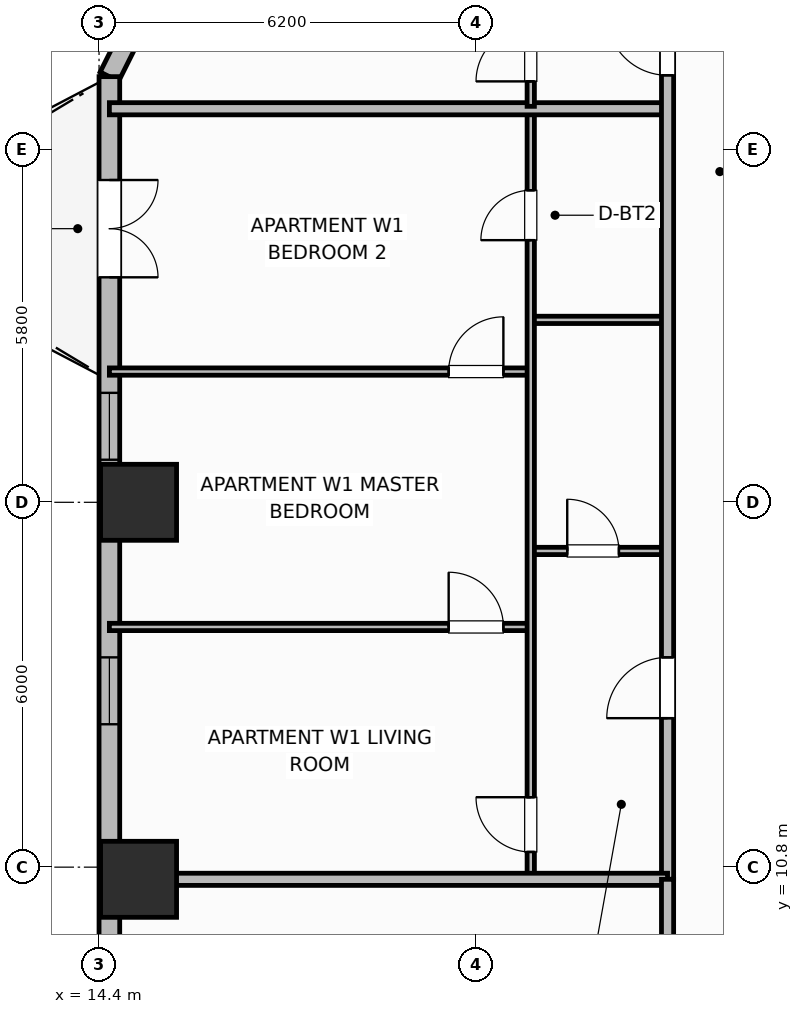
"""IFC4 building model, lengths in metres.
Left out: names, types, materials, properties, quantities, classifications, styles, units other than length and angle.
Written with IfcOpenShell. Run it as: python <this file> out.ifc"""

import sys

from ifc_helpers import new_model, si_unit, direction, frame, frame_2d, origin, origin_2d, place, context, subcontext, project, spatial, rectangle, extrude, element, fill, save


model = new_model("IFC4")
c1 = context("Model", 3, precision=1e-05, world=origin(), true_north=direction((0.0, 1.0)))
c2 = subcontext(c1, "Body", "Model", "MODEL_VIEW")
j1 = project(units=[si_unit("LENGTHUNIT", "METRE"), si_unit("PLANEANGLEUNIT", "RADIAN")], contexts=[c1])
p1 = place(None, origin())
s1 = spatial("IfcSite", under=j1, at=p1, CompositionType="ELEMENT")
p2 = place(p1, origin())
s2 = spatial("IfcBuilding", under=s1, at=p2, CompositionType="ELEMENT")
p3 = place(p2, frame((0.0, 0.0, 73.2)))
s3 = spatial("IfcBuildingStorey", under=s2, at=p3, CompositionType="ELEMENT", Elevation=73.2)
for number, where, z_axis, x_axis in (
    (1, (15.05, 10.6, 0.0), (0.0, 0.0, 1.0), (1.0, 0.0, 0.0)),
    (2, (15.05, 16.8, 0.0), (0.0, 0.0, 1.0), (1.0, 0.0, 0.0)),
):
    element("IfcColumn", number, at=place(p3, frame(where, z_axis=z_axis, x_axis=x_axis)), inside=s3, PredefinedType="COLUMN", context=c2, shape_type="SweptSolid", body=[
        extrude(rectangle(XDim=1.25, YDim=1.25, at=origin_2d()), origin(), (0.0, 0.0, 1.0), 3.7),
    ])
p4 = place(p3, frame((15.67, 26.0, 0.0), z_axis=(0.0, 0.0, 1.0), x_axis=(-0.447173890385, -0.894447042456, 0.0)))
e3 = element("IfcWall", 3, at=p4, inside=s3, PredefinedType="SOLIDWALL", context=c2, shape_type="SweptSolid", body=[
    extrude(rectangle(XDim=2.459, YDim=0.34, at=frame_2d((1.23, 0.0))), origin(), (0.0, 0.0, 1.0), 2.66),
])
p5 = place(p4, frame((0.68, 0.0, 0.85)))
e4 = element("IfcOpeningElement", 4, at=p5, cuts=e3, PredefinedType="OPENING", context=c2, shape_type="SweptSolid", body=[
    extrude(rectangle(XDim=1.1, YDim=1.65, at=frame_2d((0.55, 0.825))), frame((0.0, 0.18, 0.0), z_axis=(0.0, -1.0, 0.0), x_axis=(1.0, 0.0, 0.0)), (0.0, 0.0, 1.0), 0.36),
])
p6 = place(p3, frame((14.57, 23.8, 0.0), z_axis=(0.0, 0.0, 1.0), x_axis=(0.0, -1.0, 0.0)))
e5 = element("IfcWall", 5, at=p6, inside=s3, PredefinedType="SOLIDWALL", context=c2, shape_type="SweptSolid", body=[
    extrude(rectangle(XDim=14.8, YDim=0.34, at=frame_2d((7.4, 0.0))), origin(), (0.0, 0.0, 1.0), 2.66),
])
p7 = place(p6, frame((1.7, 0.0, 0.0)))
e6 = element("IfcOpeningElement", 6, at=p7, cuts=e5, PredefinedType="OPENING", context=c2, shape_type="SweptSolid", body=[
    extrude(rectangle(XDim=1.6, YDim=2.1, at=frame_2d((0.8, 1.05))), frame((0.0, 0.18, 0.0), z_axis=(0.0, -1.0, 0.0), x_axis=(1.0, 0.0, 0.0)), (0.0, 0.0, 1.0), 0.36),
])
p8 = place(p6, frame((5.2, 0.0, 0.85)))
e7 = element("IfcOpeningElement", 7, at=p8, cuts=e5, PredefinedType="OPENING", context=c2, shape_type="SweptSolid", body=[
    extrude(rectangle(XDim=1.1, YDim=1.65, at=frame_2d((0.55, 0.825))), frame((0.0, 0.18, 0.0), z_axis=(0.0, -1.0, 0.0), x_axis=(1.0, 0.0, 0.0)), (0.0, 0.0, 1.0), 0.36),
])
p9 = place(p6, frame((9.55, 0.0, 0.89)))
e8 = element("IfcOpeningElement", 8, at=p9, cuts=e5, PredefinedType="OPENING", context=c2, shape_type="SweptSolid", body=[
    extrude(rectangle(XDim=1.1, YDim=1.65, at=frame_2d((0.55, 0.825))), frame((0.0, 0.18, 0.0), z_axis=(0.0, -1.0, 0.0), x_axis=(1.0, 0.0, 0.0)), (0.0, 0.0, 1.0), 0.36),
])
p10 = place(p3, frame((21.5, 16.0, 0.0), z_axis=(0.0, 0.0, 1.0), x_axis=(1.0, 0.0, 0.0)))
e9 = element("IfcWall", 9, at=p10, inside=s3, PredefinedType="PARTITIONING", context=c2, shape_type="SweptSolid", body=[
    extrude(rectangle(XDim=2.25, YDim=0.12, at=frame_2d((1.125, 0.0))), origin(), (0.0, 0.0, 1.0), 2.49),
])
p11 = place(p10, frame((0.6, 0.0, 0.0)))
e10 = element("IfcOpeningElement", 10, at=p11, cuts=e9, PredefinedType="OPENING", context=c2, shape_type="SweptSolid", body=[
    extrude(rectangle(XDim=0.85, YDim=2.1, at=frame_2d((0.425, 1.05))), frame((0.0, 0.07, 0.0), z_axis=(0.0, -1.0, 0.0), x_axis=(1.0, 0.0, 0.0)), (0.0, 0.0, 1.0), 0.14),
])
p12 = place(p3, frame((21.5, 19.8, 0.0), z_axis=(0.0, 0.0, 1.0), x_axis=(1.0, 0.0, 0.0)))
e11 = element("IfcWall", 11, at=p12, inside=s3, PredefinedType="PARTITIONING", context=c2, shape_type="SweptSolid", body=[
    extrude(rectangle(XDim=2.25, YDim=0.12, at=frame_2d((1.125, 0.0))), origin(), (0.0, 0.0, 1.0), 2.49),
])
p13 = place(p3, frame((14.57, 14.75, 0.0), z_axis=(0.0, 0.0, 1.0), x_axis=(1.0, 0.0, 0.0)))
e12 = element("IfcWall", 12, at=p13, inside=s3, PredefinedType="PARTITIONING", context=c2, shape_type="SweptSolid", body=[
    extrude(rectangle(XDim=6.93, YDim=0.12, at=frame_2d((3.465, 0.0))), origin(), (0.0, 0.0, 1.0), 2.49),
])
p14 = place(p13, frame((5.58, 0.0, 0.0)))
e13 = element("IfcOpeningElement", 13, at=p14, cuts=e12, PredefinedType="OPENING", context=c2, shape_type="SweptSolid", body=[
    extrude(rectangle(XDim=0.9, YDim=2.1, at=frame_2d((0.45, 1.05))), frame((0.0, 0.07, 0.0), z_axis=(0.0, -1.0, 0.0), x_axis=(1.0, 0.0, 0.0)), (0.0, 0.0, 1.0), 0.14),
])
p15 = place(p3, frame((14.57, 18.95, 0.0), z_axis=(0.0, 0.0, 1.0), x_axis=(1.0, 0.0, 0.0)))
e14 = element("IfcWall", 14, at=p15, inside=s3, PredefinedType="PARTITIONING", context=c2, shape_type="SweptSolid", body=[
    extrude(rectangle(XDim=6.93, YDim=0.12, at=frame_2d((3.465, 0.0))), origin(), (0.0, 0.0, 1.0), 2.49),
])
p16 = place(p15, frame((5.58, 0.0, 0.0)))
e15 = element("IfcOpeningElement", 15, at=p16, cuts=e14, PredefinedType="OPENING", context=c2, shape_type="SweptSolid", body=[
    extrude(rectangle(XDim=0.9, YDim=2.1, at=frame_2d((0.45, 1.05))), frame((0.0, 0.07, 0.0), z_axis=(0.0, -1.0, 0.0), x_axis=(1.0, 0.0, 0.0)), (0.0, 0.0, 1.0), 0.14),
])
p17 = place(p3, frame((21.5, 10.64, 0.0), z_axis=(0.0, 0.0, 1.0), x_axis=(0.0, 1.0, 0.0)))
e16 = element("IfcWall", 16, at=p17, inside=s3, PredefinedType="PARTITIONING", context=c2, shape_type="SweptSolid", body=[
    extrude(rectangle(XDim=12.592, YDim=0.12, at=frame_2d((6.296, 0.0))), origin(), (0.0, 0.0, 1.0), 2.49),
])
p18 = place(p17, frame((0.41, 0.0, 0.0)))
e17 = element("IfcOpeningElement", 17, at=p18, cuts=e16, PredefinedType="OPENING", context=c2, shape_type="SweptSolid", body=[
    extrude(rectangle(XDim=0.9, YDim=2.1, at=frame_2d((0.45, 1.05))), frame((0.0, 0.07, 0.0), z_axis=(0.0, -1.0, 0.0), x_axis=(1.0, 0.0, 0.0)), (0.0, 0.0, 1.0), 0.14),
])
p19 = place(p17, frame((10.471, 0.0, 0.0)))
e18 = element("IfcOpeningElement", 18, at=p19, cuts=e16, PredefinedType="OPENING", context=c2, shape_type="SweptSolid", body=[
    extrude(rectangle(XDim=0.82, YDim=2.08, at=frame_2d((0.41, 1.04))), frame((0.0, 0.07, 0.0), z_axis=(0.0, -1.0, 0.0), x_axis=(1.0, 0.0, 0.0)), (0.0, 0.0, 1.0), 0.14),
])
p20 = place(p3, frame((14.57, 23.272, 0.0), z_axis=(0.0, 0.0, 1.0), x_axis=(1.0, 0.0, 0.0)))
e19 = element("IfcWall", 19, at=p20, inside=s3, PredefinedType="PARTITIONING", context=c2, shape_type="SweptSolid", body=[
    extrude(rectangle(XDim=9.18, YDim=0.2, at=frame_2d((4.59, 0.0))), origin(), (0.0, 0.0, 1.0), 2.49),
])
p21 = place(p3, frame((21.5, 23.312, 0.0), z_axis=(0.0, 0.0, 1.0), x_axis=(0.0, 1.0, 0.0)))
e20 = element("IfcWall", 20, at=p21, inside=s3, PredefinedType="PARTITIONING", context=c2, shape_type="SweptSolid", body=[
    extrude(rectangle(XDim=11.888, YDim=0.12, at=frame_2d((5.944, 0.0))), origin(), (0.0, 0.0, 1.0), 2.49),
])
p22 = place(p21, frame((0.41, 0.0, 0.0)))
e21 = element("IfcOpeningElement", 21, at=p22, cuts=e20, PredefinedType="OPENING", context=c2, shape_type="SweptSolid", body=[
    extrude(rectangle(XDim=0.9, YDim=2.1, at=frame_2d((0.45, 1.05))), frame((0.0, 0.07, 0.0), z_axis=(0.0, -1.0, 0.0), x_axis=(1.0, 0.0, 0.0)), (0.0, 0.0, 1.0), 0.14),
])
p23 = place(p21, frame((10.119, 0.0, 0.0)))
e22 = element("IfcOpeningElement", 22, at=p23, cuts=e20, PredefinedType="OPENING", context=c2, shape_type="SweptSolid", body=[
    extrude(rectangle(XDim=0.82, YDim=2.08, at=frame_2d((0.41, 1.04))), frame((0.0, 0.07, 0.0), z_axis=(0.0, -1.0, 0.0), x_axis=(1.0, 0.0, 0.0)), (0.0, 0.0, 1.0), 0.14),
])
p24 = place(p3, frame((23.75, 10.6, 0.0), z_axis=(0.0, 0.0, 1.0), x_axis=(0.0, 1.0, 0.0)))
e23 = element("IfcWall", 23, at=p24, inside=s3, PredefinedType="PARTITIONING", context=c2, shape_type="SweptSolid", body=[
    extrude(rectangle(XDim=35.2, YDim=0.2, at=frame_2d((17.6, 0.0))), origin(), (0.0, 0.0, 1.0), 2.49),
])
p25 = place(p24, frame((2.65, 0.0, 0.0)))
e24 = element("IfcOpeningElement", 24, at=p25, cuts=e23, PredefinedType="OPENING", context=c2, shape_type="SweptSolid", body=[
    extrude(rectangle(XDim=1.0, YDim=2.15, at=frame_2d((0.5, 1.075))), frame((0.0, 0.11, 0.0), z_axis=(0.0, -1.0, 0.0), x_axis=(1.0, 0.0, 0.0)), (0.0, 0.0, 1.0), 0.22),
])
p26 = place(p24, frame((13.222, 0.0, 0.0)))
e25 = element("IfcOpeningElement", 25, at=p26, cuts=e23, PredefinedType="OPENING", context=c2, shape_type="SweptSolid", body=[
    extrude(rectangle(XDim=1.0, YDim=2.15, at=frame_2d((0.5, 1.075))), frame((0.0, 0.11, 0.0), z_axis=(0.0, -1.0, 0.0), x_axis=(1.0, 0.0, 0.0)), (0.0, 0.0, 1.0), 0.22),
])
p27 = place(p24, frame((25.19, 0.0, 0.0)))
e26 = element("IfcOpeningElement", 26, at=p27, cuts=e23, PredefinedType="OPENING", context=c2, shape_type="SweptSolid", body=[
    extrude(rectangle(XDim=1.0, YDim=2.15, at=frame_2d((0.5, 1.075))), frame((0.0, 0.11, 0.0), z_axis=(0.0, -1.0, 0.0), x_axis=(1.0, 0.0, 0.0)), (0.0, 0.0, 1.0), 0.22),
])
p28 = place(p3, frame((14.99, 10.6, 0.0), z_axis=(0.0, 0.0, 1.0), x_axis=(1.0, 0.0, 0.0)))
e27 = element("IfcWall", 27, at=p28, inside=s3, PredefinedType="PARTITIONING", context=c2, shape_type="SweptSolid", body=[
    extrude(rectangle(XDim=8.76, YDim=0.2, at=frame_2d((4.38, 0.0))), origin(), (0.0, 0.0, 1.0), 2.49),
])
p29 = place(p3, frame((23.75, 4.97, 0.0), z_axis=(0.0, 0.0, 1.0), x_axis=(0.0, 1.0, 0.0)))
e28 = element("IfcWall", 28, at=p29, inside=s3, PredefinedType="PARTITIONING", context=c2, shape_type="SweptSolid", body=[
    extrude(rectangle(XDim=5.63, YDim=0.2, at=frame_2d((2.815, 0.0))), origin(), (0.0, 0.0, 1.0), 2.49),
])
p30 = place(p7, origin())
e29 = element("IfcDoor", 29, at=p30, inside=s3, OperationType="DOUBLE_DOOR_SINGLE_SWING", PredefinedType="DOOR", context=c2, shape_type="SweptSolid", body=[
    extrude(rectangle(XDim=1.6, YDim=2.1, at=frame_2d((0.8, 1.05))), frame((0.0, 0.025, 0.0), z_axis=(0.0, -1.0, 0.0), x_axis=(1.0, 0.0, 0.0)), (0.0, 0.0, 1.0), 0.05),
])
fill(e6, e29)
p31 = place(p8, origin())
e30 = element("IfcWindow", 30, at=p31, inside=s3, PartitioningType="SINGLE_PANEL", PredefinedType="WINDOW", context=c2, shape_type="SweptSolid", body=[
    extrude(rectangle(XDim=1.1, YDim=1.65, at=frame_2d((0.55, 0.825))), frame((0.0, 0.03, 0.0), z_axis=(0.0, -1.0, 0.0), x_axis=(1.0, 0.0, 0.0)), (0.0, 0.0, 1.0), 0.06),
])
fill(e7, e30)
p32 = place(p9, origin())
e31 = element("IfcWindow", 31, at=p32, inside=s3, PartitioningType="SINGLE_PANEL", PredefinedType="WINDOW", context=c2, shape_type="SweptSolid", body=[
    extrude(rectangle(XDim=1.1, YDim=1.65, at=frame_2d((0.55, 0.825))), frame((0.0, 0.03, 0.0), z_axis=(0.0, -1.0, 0.0), x_axis=(1.0, 0.0, 0.0)), (0.0, 0.0, 1.0), 0.06),
])
fill(e8, e31)
p33 = place(p11, origin())
e32 = element("IfcDoor", 32, at=p33, inside=s3, OperationType="SINGLE_SWING_LEFT", PredefinedType="DOOR", context=c2, shape_type="SweptSolid", body=[
    extrude(rectangle(XDim=0.85, YDim=2.1, at=frame_2d((0.425, 1.05))), frame((0.0, 0.025, 0.0), z_axis=(0.0, -1.0, 0.0), x_axis=(1.0, 0.0, 0.0)), (0.0, 0.0, 1.0), 0.05),
])
fill(e10, e32)
p34 = place(p14, origin())
e33 = element("IfcDoor", 33, at=p34, inside=s3, OperationType="SINGLE_SWING_LEFT", PredefinedType="DOOR", context=c2, shape_type="SweptSolid", body=[
    extrude(rectangle(XDim=0.9, YDim=2.1, at=frame_2d((0.45, 1.05))), frame((0.0, 0.025, 0.0), z_axis=(0.0, -1.0, 0.0), x_axis=(1.0, 0.0, 0.0)), (0.0, 0.0, 1.0), 0.05),
])
fill(e13, e33)
p35 = place(p16, origin())
e34 = element("IfcDoor", 34, at=p35, inside=s3, OperationType="SINGLE_SWING_RIGHT", PredefinedType="DOOR", context=c2, shape_type="SweptSolid", body=[
    extrude(rectangle(XDim=0.9, YDim=2.1, at=frame_2d((0.45, 1.05))), frame((0.0, 0.025, 0.0), z_axis=(0.0, -1.0, 0.0), x_axis=(1.0, 0.0, 0.0)), (0.0, 0.0, 1.0), 0.05),
])
fill(e15, e34)
p36 = place(p18, origin())
e35 = element("IfcDoor", 35, at=p36, inside=s3, OperationType="SINGLE_SWING_RIGHT", PredefinedType="DOOR", context=c2, shape_type="SweptSolid", body=[
    extrude(rectangle(XDim=0.9, YDim=2.1, at=frame_2d((0.45, 1.05))), frame((0.0, 0.025, 0.0), z_axis=(0.0, -1.0, 0.0), x_axis=(1.0, 0.0, 0.0)), (0.0, 0.0, 1.0), 0.05),
])
fill(e17, e35)
p37 = place(p19, origin())
e36 = element("IfcDoor", 36, at=p37, inside=s3, OperationType="SINGLE_SWING_LEFT", PredefinedType="DOOR", context=c2, shape_type="SweptSolid", body=[
    extrude(rectangle(XDim=0.82, YDim=2.08, at=frame_2d((0.41, 1.04))), frame((0.0, 0.025, 0.0), z_axis=(0.0, -1.0, 0.0), x_axis=(1.0, 0.0, 0.0)), (0.0, 0.0, 1.0), 0.05),
])
fill(e18, e36)
p38 = place(p22, origin())
e37 = element("IfcDoor", 37, at=p38, inside=s3, OperationType="SINGLE_SWING_LEFT", PredefinedType="DOOR", context=c2, shape_type="SweptSolid", body=[
    extrude(rectangle(XDim=0.9, YDim=2.1, at=frame_2d((0.45, 1.05))), frame((0.0, 0.025, 0.0), z_axis=(0.0, -1.0, 0.0), x_axis=(1.0, 0.0, 0.0)), (0.0, 0.0, 1.0), 0.05),
])
fill(e21, e37)
p39 = place(p25, origin())
e38 = element("IfcDoor", 38, at=p39, inside=s3, OperationType="SINGLE_SWING_LEFT", PredefinedType="DOOR", context=c2, shape_type="SweptSolid", body=[
    extrude(rectangle(XDim=1.0, YDim=2.15, at=frame_2d((0.5, 1.075))), frame((0.0, 0.025, 0.0), z_axis=(0.0, -1.0, 0.0), x_axis=(1.0, 0.0, 0.0)), (0.0, 0.0, 1.0), 0.05),
])
fill(e24, e38)
p40 = place(p26, origin())
e39 = element("IfcDoor", 39, at=p40, inside=s3, OperationType="SINGLE_SWING_RIGHT", PredefinedType="DOOR", context=c2, shape_type="SweptSolid", body=[
    extrude(rectangle(XDim=1.0, YDim=2.15, at=frame_2d((0.5, 1.075))), frame((0.0, 0.025, 0.0), z_axis=(0.0, -1.0, 0.0), x_axis=(1.0, 0.0, 0.0)), (0.0, 0.0, 1.0), 0.05),
])
fill(e25, e39)
save(model, sys.argv[1])
